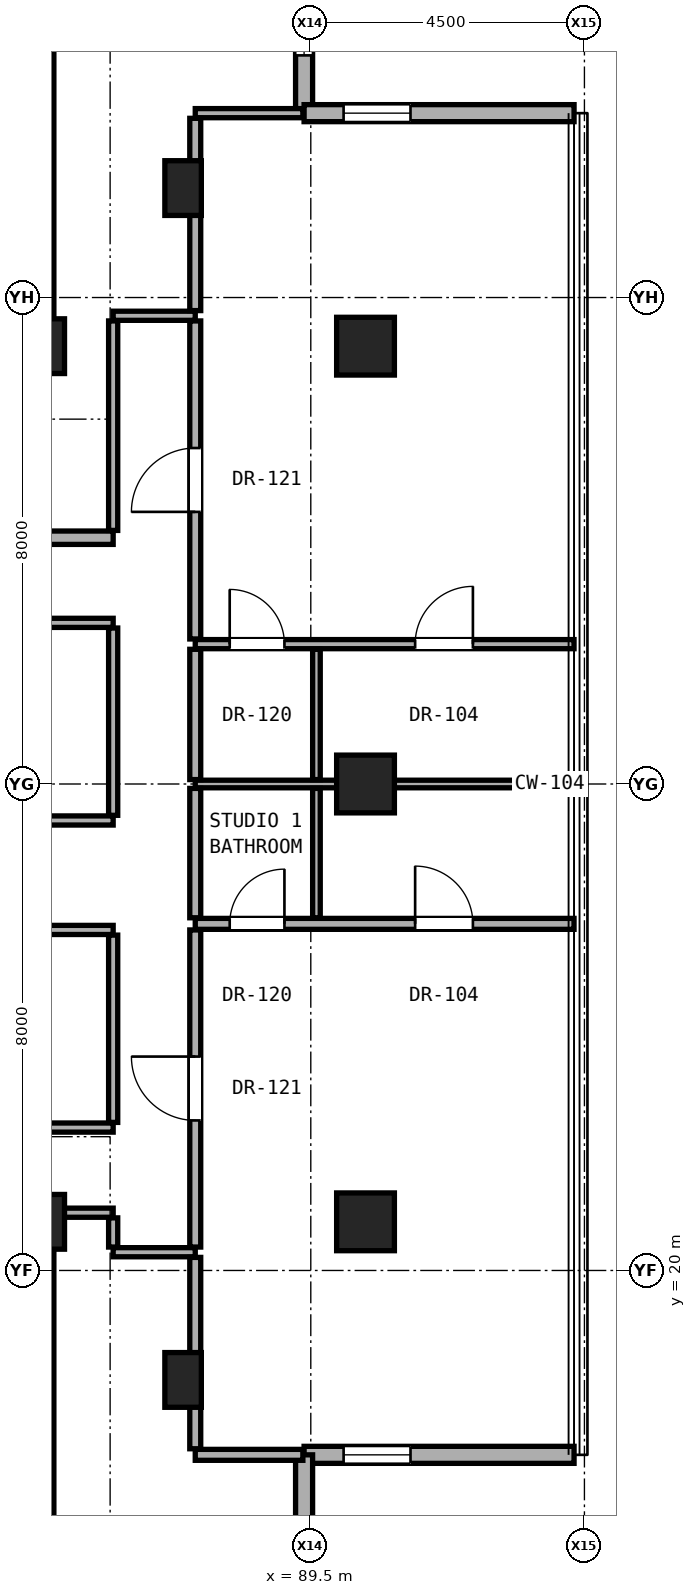
"""IFC4 building model, lengths in metres.
Left out: names, types, materials, properties, quantities, classifications, styles, units other than length and angle.
Written with IfcOpenShell. Run it as: python <this file> out.ifc"""

import sys

from ifc_helpers import new_model, si_unit, direction, frame, frame_2d, origin, origin_2d, place, context, subcontext, project, spatial, rectangle, hollow_rectangle, extrude, element, fill, save


model = new_model("IFC4")
c1 = context("Model", 3, precision=1e-05, world=origin(), true_north=direction((0.0, 1.0)))
c2 = subcontext(c1, "Body", "Model", "MODEL_VIEW")
j1 = project(units=[si_unit("LENGTHUNIT", "METRE"), si_unit("PLANEANGLEUNIT", "RADIAN")], contexts=[c1])
p1 = place(None, origin())
s1 = spatial("IfcSite", under=j1, at=p1, CompositionType="ELEMENT")
p2 = place(p1, origin())
s2 = spatial("IfcBuilding", under=s1, at=p2, CompositionType="ELEMENT")
p3 = place(p2, frame((0.0, 0.0, 196.65)))
s3 = spatial("IfcBuildingStorey", under=s2, at=p3, CompositionType="ELEMENT", Elevation=196.65)
for number, where, z_axis, x_axis in (
    (1, (85.0, 20.8, 0.0), (0.0, 0.0, 1.0), (1.0, 0.0, 0.0)),
    (2, (85.0, 35.2, 0.0), (0.0, 0.0, 1.0), (1.0, 0.0, 0.0)),
):
    element("IfcColumn", number, at=place(p3, frame(where, z_axis=z_axis, x_axis=x_axis)), inside=s3, PredefinedType="COLUMN", context=c2, shape_type="SweptSolid", body=[
        extrude(rectangle(XDim=0.9, YDim=0.9, at=origin_2d()), origin(), (0.0, 0.0, 1.0), 3.25),
    ])
for number, where, z_axis, x_axis in (
    (3, (90.4, 20.8, 0.0), (0.0, 0.0, 1.0), (1.0, 0.0, 0.0)),
    (4, (90.4, 28.0, 0.0), (0.0, 0.0, 1.0), (1.0, 0.0, 0.0)),
    (5, (90.4, 35.2, 0.0), (0.0, 0.0, 1.0), (1.0, 0.0, 0.0)),
):
    element("IfcColumn", number, at=place(p3, frame(where, z_axis=z_axis, x_axis=x_axis)), inside=s3, PredefinedType="COLUMN", context=c2, shape_type="SweptSolid", body=[
        extrude(hollow_rectangle(XDim=0.95, YDim=0.95, WallThickness=0.05, at=origin_2d()), origin(), (0.0, 0.0, 1.0), 3.25),
    ])
for number, where, z_axis, x_axis in (
    (6, (87.4, 18.2, 0.0), (0.0, 0.0, 1.0), (1.0, 0.0, 0.0)),
    (7, (87.4, 37.8, 0.0), (0.0, 0.0, 1.0), (1.0, 0.0, 0.0)),
):
    element("IfcColumn", number, at=place(p3, frame(where, z_axis=z_axis, x_axis=x_axis)), inside=s3, PredefinedType="PILASTER", context=c2, shape_type="SweptSolid", body=[
        extrude(rectangle(XDim=0.6, YDim=0.9, at=origin_2d()), origin(), (0.0, 0.0, 1.0), 3.25),
    ])
for number, where, z_axis, x_axis in (
    (8, (85.0, 35.2, 0.0), (0.0, 0.0, 1.0), (0.0, 1.0, 0.0)),
    (9, (85.0, 15.2, 0.0), (0.0, 0.0, 1.0), (0.0, 1.0, 0.0)),
):
    element("IfcWall", number, at=place(p3, frame(where, z_axis=z_axis, x_axis=x_axis)), inside=s3, PredefinedType="SHEAR", context=c2, shape_type="SweptSolid", body=[
        extrude(rectangle(XDim=5.6, YDim=0.55, at=frame_2d((2.8, 0.0))), origin(), (0.0, 0.0, 1.0), 3.05),
    ])
p4 = place(p3, frame((89.39, 39.032, 0.0), z_axis=(0.0, 0.0, 1.0), x_axis=(0.0, 1.0, 0.0)))
e10 = element("IfcWall", 10, at=p4, inside=s3, PredefinedType="SOLIDWALL", context=c2, shape_type="SweptSolid", body=[
    extrude(rectangle(XDim=4.44, YDim=0.28, at=frame_2d((2.22, 0.0))), origin(), (0.0, 0.0, 1.0), 3.03),
])
p5 = place(p4, frame((0.95, 0.0, 0.85)))
e11 = element("IfcOpeningElement", 11, at=p5, cuts=e10, PredefinedType="OPENING", context=c2, shape_type="SweptSolid", body=[
    extrude(rectangle(XDim=1.1, YDim=2.0, at=frame_2d((0.55, 1.0))), frame((0.0, 0.15, 0.0), z_axis=(0.0, -1.0, 0.0), x_axis=(1.0, 0.0, 0.0)), (0.0, 0.0, 1.0), 0.3),
])
p6 = place(p3, frame((89.39, 16.968, 0.0), z_axis=(0.0, 0.0, 1.0), x_axis=(1.0, 0.0, 0.0)))
e12 = element("IfcWall", 12, at=p6, inside=s3, PredefinedType="SOLIDWALL", context=c2, shape_type="SweptSolid", body=[
    extrude(rectangle(XDim=4.44, YDim=0.28, at=frame_2d((2.22, 0.0))), origin(), (0.0, 0.0, 1.0), 3.03),
])
p7 = place(p6, frame((0.65, 0.0, 0.85)))
e13 = element("IfcOpeningElement", 13, at=p7, cuts=e12, PredefinedType="OPENING", context=c2, shape_type="SweptSolid", body=[
    extrude(rectangle(XDim=1.1, YDim=2.0, at=frame_2d((0.55, 1.0))), frame((0.0, 0.15, 0.0), z_axis=(0.0, -1.0, 0.0), x_axis=(1.0, 0.0, 0.0)), (0.0, 0.0, 1.0), 0.3),
])
p8 = place(p3, frame((89.39, 12.528, 0.0), z_axis=(0.0, 0.0, 1.0), x_axis=(0.0, 1.0, 0.0)))
e14 = element("IfcWall", 14, at=p8, inside=s3, PredefinedType="SOLIDWALL", context=c2, shape_type="SweptSolid", body=[
    extrude(rectangle(XDim=4.44, YDim=0.28, at=frame_2d((2.22, 0.0))), origin(), (0.0, 0.0, 1.0), 3.03),
])
p9 = place(p3, frame((93.83, 39.032, 0.0), z_axis=(0.0, 0.0, 1.0), x_axis=(-1.0, 0.0, 0.0)))
e15 = element("IfcWall", 15, at=p9, inside=s3, PredefinedType="SOLIDWALL", context=c2, shape_type="SweptSolid", body=[
    extrude(rectangle(XDim=4.44, YDim=0.28, at=frame_2d((2.22, 0.0))), origin(), (0.0, 0.0, 1.0), 3.03),
])
p10 = place(p9, frame((2.69, 0.0, 0.85)))
e16 = element("IfcOpeningElement", 16, at=p10, cuts=e15, PredefinedType="OPENING", context=c2, shape_type="SweptSolid", body=[
    extrude(rectangle(XDim=1.1, YDim=2.0, at=frame_2d((0.55, 1.0))), frame((0.0, 0.15, 0.0), z_axis=(0.0, -1.0, 0.0), x_axis=(1.0, 0.0, 0.0)), (0.0, 0.0, 1.0), 0.3),
])
p11 = place(p3, frame((87.6, 16.968, 0.0), z_axis=(0.0, 0.0, 1.0), x_axis=(1.0, 0.0, 0.0)))
e17 = element("IfcWall", 17, at=p11, inside=s3, PredefinedType="PARTITIONING", context=c2, shape_type="SweptSolid", body=[
    extrude(rectangle(XDim=1.77, YDim=0.18, at=frame_2d((0.885, 0.0))), origin(), (0.0, 0.0, 1.0), 3.05),
])
p12 = place(p3, frame((86.25, 20.3, 0.0), z_axis=(0.0, 0.0, 1.0), x_axis=(1.0, 0.0, 0.0)))
e18 = element("IfcWall", 18, at=p12, inside=s3, PredefinedType="PARTITIONING", context=c2, shape_type="SweptSolid", body=[
    extrude(rectangle(XDim=1.35, YDim=0.15, at=frame_2d((0.675, 0.0))), origin(), (0.0, 0.0, 1.0), 3.05),
])
p13 = place(p3, frame((85.27, 20.95, 0.0), z_axis=(0.0, 0.0, 1.0), x_axis=(1.0, 0.0, 0.0)))
e19 = element("IfcWall", 19, at=p13, inside=s3, PredefinedType="PARTITIONING", context=c2, shape_type="SweptSolid", body=[
    extrude(rectangle(XDim=0.98, YDim=0.15, at=frame_2d((0.49, 0.0))), origin(), (0.0, 0.0, 1.0), 2.442),
])
p14 = place(p3, frame((78.64, 22.35, 0.0), z_axis=(0.0, 0.0, 1.0), x_axis=(1.0, 0.0, 0.0)))
e20 = element("IfcWall", 20, at=p14, inside=s3, PredefinedType="PARTITIONING", context=c2, shape_type="SweptSolid", body=[
    extrude(rectangle(XDim=7.61, YDim=0.15, at=frame_2d((3.805, 0.0))), origin(), (0.0, 0.0, 1.0), 2.186),
])
p15 = place(p14, frame((3.33, 0.0, 0.0)))
e21 = element("IfcOpeningElement", 21, at=p15, cuts=e20, PredefinedType="OPENING", context=c2, shape_type="SweptSolid", body=[
    extrude(rectangle(XDim=0.95, YDim=2.15, at=frame_2d((0.475, 1.075))), frame((0.0, 0.085, 0.0), z_axis=(0.0, -1.0, 0.0), x_axis=(1.0, 0.0, 0.0)), (0.0, 0.0, 1.0), 0.17),
])
p16 = place(p3, frame((78.6, 25.6, 0.0), z_axis=(0.0, 0.0, 1.0), x_axis=(1.0, 0.0, 0.0)))
e22 = element("IfcWall", 22, at=p16, inside=s3, PredefinedType="PARTITIONING", context=c2, shape_type="SweptSolid", body=[
    extrude(rectangle(XDim=7.65, YDim=0.15, at=frame_2d((3.825, 0.0))), origin(), (0.0, 0.0, 1.0), 2.186),
])
p17 = place(p3, frame((87.6, 25.7, 0.0), z_axis=(0.0, 0.0, 1.0), x_axis=(1.0, 0.0, 0.0)))
e23 = element("IfcWall", 23, at=p17, inside=s3, PredefinedType="PARTITIONING", context=c2, shape_type="SweptSolid", body=[
    extrude(rectangle(XDim=6.229, YDim=0.18, at=frame_2d((3.115, 0.0))), origin(), (0.0, 0.0, 1.0), 2.269),
])
p18 = place(p17, frame((3.616, 0.0, 0.0)))
e24 = element("IfcOpeningElement", 24, at=p18, cuts=e23, PredefinedType="OPENING", context=c2, shape_type="SweptSolid", body=[
    extrude(rectangle(XDim=0.95, YDim=2.15, at=frame_2d((0.475, 1.075))), frame((0.0, 0.1, 0.0), z_axis=(0.0, -1.0, 0.0), x_axis=(1.0, 0.0, 0.0)), (0.0, 0.0, 1.0), 0.2),
])
p19 = place(p17, frame((0.566, 0.0, 0.0)))
e25 = element("IfcOpeningElement", 25, at=p19, cuts=e23, PredefinedType="OPENING", context=c2, shape_type="SweptSolid", body=[
    extrude(rectangle(XDim=0.9, YDim=2.1, at=frame_2d((0.45, 1.05))), frame((0.0, 0.1, 0.0), z_axis=(0.0, -1.0, 0.0), x_axis=(1.0, 0.0, 0.0)), (0.0, 0.0, 1.0), 0.2),
])
p20 = place(p3, frame((78.6, 27.4, 0.0), z_axis=(0.0, 0.0, 1.0), x_axis=(1.0, 0.0, 0.0)))
e26 = element("IfcWall", 26, at=p20, inside=s3, PredefinedType="PARTITIONING", context=c2, shape_type="SweptSolid", body=[
    extrude(rectangle(XDim=7.65, YDim=0.15, at=frame_2d((3.825, 0.0))), origin(), (0.0, 0.0, 1.0), 2.186),
])
p21 = place(p3, frame((87.6, 28.0, 0.0), z_axis=(0.0, 0.0, 1.0), x_axis=(1.0, 0.0, 0.0)))
e27 = element("IfcWall", 27, at=p21, inside=s3, PredefinedType="PARTITIONING", context=c2, shape_type="SweptSolid", body=[
    extrude(rectangle(XDim=6.229, YDim=0.125, at=frame_2d((3.115, 0.0))), origin(), (0.0, 0.0, 1.0), 2.269),
])
p22 = place(p3, frame((87.6, 30.3, 0.0), z_axis=(0.0, 0.0, 1.0), x_axis=(1.0, 0.0, 0.0)))
e28 = element("IfcWall", 28, at=p22, inside=s3, PredefinedType="PARTITIONING", context=c2, shape_type="SweptSolid", body=[
    extrude(rectangle(XDim=6.229, YDim=0.15, at=frame_2d((3.115, 0.0))), origin(), (0.0, 0.0, 1.0), 2.269),
])
p23 = place(p22, frame((3.616, 0.0, 0.0)))
e29 = element("IfcOpeningElement", 29, at=p23, cuts=e28, PredefinedType="OPENING", context=c2, shape_type="SweptSolid", body=[
    extrude(rectangle(XDim=0.95, YDim=2.15, at=frame_2d((0.475, 1.075))), frame((0.0, 0.085, 0.0), z_axis=(0.0, -1.0, 0.0), x_axis=(1.0, 0.0, 0.0)), (0.0, 0.0, 1.0), 0.17),
])
p24 = place(p22, frame((0.566, 0.0, 0.0)))
e30 = element("IfcOpeningElement", 30, at=p24, cuts=e28, PredefinedType="OPENING", context=c2, shape_type="SweptSolid", body=[
    extrude(rectangle(XDim=0.9, YDim=2.1, at=frame_2d((0.45, 1.05))), frame((0.0, 0.085, 0.0), z_axis=(0.0, -1.0, 0.0), x_axis=(1.0, 0.0, 0.0)), (0.0, 0.0, 1.0), 0.17),
])
p25 = place(p3, frame((78.64, 30.65, 0.0), z_axis=(0.0, 0.0, 1.0), x_axis=(1.0, 0.0, 0.0)))
e31 = element("IfcWall", 31, at=p25, inside=s3, PredefinedType="PARTITIONING", context=c2, shape_type="SweptSolid", body=[
    extrude(rectangle(XDim=7.61, YDim=0.15, at=frame_2d((3.805, 0.0))), origin(), (0.0, 0.0, 1.0), 2.186),
])
p26 = place(p25, frame((3.33, 0.0, 0.0)))
e32 = element("IfcOpeningElement", 32, at=p26, cuts=e31, PredefinedType="OPENING", context=c2, shape_type="SweptSolid", body=[
    extrude(rectangle(XDim=0.95, YDim=2.15, at=frame_2d((0.475, 1.075))), frame((0.0, 0.085, 0.0), z_axis=(0.0, -1.0, 0.0), x_axis=(1.0, 0.0, 0.0)), (0.0, 0.0, 1.0), 0.17),
])
p27 = place(p3, frame((71.55, 32.05, 0.0), z_axis=(0.0, 0.0, 1.0), x_axis=(1.0, 0.0, 0.0)))
e33 = element("IfcWall", 33, at=p27, inside=s3, PredefinedType="SOLIDWALL", context=c2, shape_type="SweptSolid", body=[
    extrude(rectangle(XDim=14.7, YDim=0.22, at=frame_2d((7.35, 0.0))), origin(), (0.0, 0.0, 1.0), 2.186),
])
p28 = place(p27, frame((6.065, 0.0, 0.0)))
e34 = element("IfcOpeningElement", 34, at=p28, cuts=e33, PredefinedType="OPENING", context=c2, shape_type="SweptSolid", body=[
    extrude(rectangle(XDim=0.85, YDim=2.01, at=frame_2d((0.425, 1.005))), frame((0.0, 0.12, 0.0), z_axis=(0.0, -1.0, 0.0), x_axis=(1.0, 0.0, 0.0)), (0.0, 0.0, 1.0), 0.24),
])
p29 = place(p27, frame((10.535, 0.0, 0.0)))
e35 = element("IfcOpeningElement", 35, at=p29, cuts=e33, PredefinedType="OPENING", context=c2, shape_type="SweptSolid", body=[
    extrude(rectangle(XDim=0.95, YDim=2.15, at=frame_2d((0.475, 1.075))), frame((0.0, 0.12, 0.0), z_axis=(0.0, -1.0, 0.0), x_axis=(1.0, 0.0, 0.0)), (0.0, 0.0, 1.0), 0.24),
])
p30 = place(p27, frame((0.7, 0.0, 0.0)))
e36 = element("IfcOpeningElement", 36, at=p30, cuts=e33, PredefinedType="OPENING", context=c2, shape_type="SweptSolid", body=[
    extrude(rectangle(XDim=0.85, YDim=2.01, at=frame_2d((0.425, 1.005))), frame((0.0, 0.12, 0.0), z_axis=(0.0, -1.0, 0.0), x_axis=(1.0, 0.0, 0.0)), (0.0, 0.0, 1.0), 0.24),
])
p31 = place(p27, frame((2.55, 0.0, 0.0)))
e37 = element("IfcOpeningElement", 37, at=p31, cuts=e33, PredefinedType="OPENING", context=c2, shape_type="SweptSolid", body=[
    extrude(rectangle(XDim=0.85, YDim=2.01, at=frame_2d((0.425, 1.005))), frame((0.0, 0.12, 0.0), z_axis=(0.0, -1.0, 0.0), x_axis=(1.0, 0.0, 0.0)), (0.0, 0.0, 1.0), 0.24),
])
p32 = place(p3, frame((86.25, 35.7, 0.0), z_axis=(0.0, 0.0, 1.0), x_axis=(1.0, 0.0, 0.0)))
e38 = element("IfcWall", 38, at=p32, inside=s3, PredefinedType="PARTITIONING", context=c2, shape_type="SweptSolid", body=[
    extrude(rectangle(XDim=1.35, YDim=0.15, at=frame_2d((0.675, 0.0))), origin(), (0.0, 0.0, 1.0), 3.05),
])
p33 = place(p3, frame((87.6, 39.032, 0.0), z_axis=(0.0, 0.0, 1.0), x_axis=(1.0, 0.0, 0.0)))
e39 = element("IfcWall", 39, at=p33, inside=s3, PredefinedType="PARTITIONING", context=c2, shape_type="SweptSolid", body=[
    extrude(rectangle(XDim=1.77, YDim=0.15, at=frame_2d((0.885, 0.0))), origin(), (0.0, 0.0, 1.0), 3.05),
])
p34 = place(p3, frame((86.25, 20.385, 0.0), z_axis=(0.0, 0.0, 1.0), x_axis=(0.0, 1.0, 0.0)))
e40 = element("IfcWall", 40, at=p34, inside=s3, PredefinedType="PARTITIONING", context=c2, shape_type="SweptSolid", body=[
    extrude(rectangle(XDim=0.48, YDim=0.15, at=frame_2d((0.24, 0.0))), origin(), (0.0, 0.0, 1.0), 2.442),
])
p35 = place(p3, frame((86.25, 22.435, 0.0), z_axis=(0.0, 0.0, 1.0), x_axis=(0.0, 1.0, 0.0)))
e41 = element("IfcWall", 41, at=p35, inside=s3, PredefinedType="PARTITIONING", context=c2, shape_type="SweptSolid", body=[
    extrude(rectangle(XDim=3.08, YDim=0.15, at=frame_2d((1.54, 0.0))), origin(), (0.0, 0.0, 1.0), 3.05),
])
p36 = place(p3, frame((86.25, 27.485, 0.0), z_axis=(0.0, 0.0, 1.0), x_axis=(0.0, 1.0, 0.0)))
e42 = element("IfcWall", 42, at=p36, inside=s3, PredefinedType="PARTITIONING", context=c2, shape_type="SweptSolid", body=[
    extrude(rectangle(XDim=3.08, YDim=0.15, at=frame_2d((1.54, 0.0))), origin(), (0.0, 0.0, 1.0), 2.346),
])
p37 = place(p3, frame((86.25, 32.17, 0.0), z_axis=(0.0, 0.0, 1.0), x_axis=(0.0, 1.0, 0.0)))
e43 = element("IfcWall", 43, at=p37, inside=s3, PredefinedType="PARTITIONING", context=c2, shape_type="SweptSolid", body=[
    extrude(rectangle(XDim=3.445, YDim=0.15, at=frame_2d((1.723, 0.0))), origin(), (0.0, 0.0, 1.0), 2.442),
])
p38 = place(p3, frame((87.6, 17.068, 0.0), z_axis=(0.0, 0.0, 1.0), x_axis=(0.0, 1.0, 0.0)))
e44 = element("IfcWall", 44, at=p38, inside=s3, PredefinedType="PARTITIONING", context=c2, shape_type="SweptSolid", body=[
    extrude(rectangle(XDim=3.147, YDim=0.18, at=frame_2d((1.573, 0.0))), origin(), (0.0, 0.0, 1.0), 2.493),
])
p39 = place(p3, frame((87.6, 20.385, 0.0), z_axis=(0.0, 0.0, 1.0), x_axis=(0.0, 1.0, 0.0)))
e45 = element("IfcWall", 45, at=p39, inside=s3, PredefinedType="PARTITIONING", context=c2, shape_type="SweptSolid", body=[
    extrude(rectangle(XDim=5.215, YDim=0.18, at=frame_2d((2.607, 0.0))), origin(), (0.0, 0.0, 1.0), 2.442),
])
p40 = place(p39, frame((2.083, 0.0, 0.0)))
e46 = element("IfcOpeningElement", 46, at=p40, cuts=e45, PredefinedType="OPENING", context=c2, shape_type="SweptSolid", body=[
    extrude(rectangle(XDim=1.05, YDim=2.2, at=frame_2d((0.525, 1.1))), frame((0.0, 0.1, 0.0), z_axis=(0.0, -1.0, 0.0), x_axis=(1.0, 0.0, 0.0)), (0.0, 0.0, 1.0), 0.2),
])
p41 = place(p3, frame((87.6, 25.8, 0.0), z_axis=(0.0, 0.0, 1.0), x_axis=(0.0, 1.0, 0.0)))
e47 = element("IfcWall", 47, at=p41, inside=s3, PredefinedType="PARTITIONING", context=c2, shape_type="SweptSolid", body=[
    extrude(rectangle(XDim=2.127, YDim=0.18, at=frame_2d((1.064, 0.0))), origin(), (0.0, 0.0, 1.0), 2.346),
])
p42 = place(p3, frame((87.6, 28.073, 0.0), z_axis=(0.0, 0.0, 1.0), x_axis=(0.0, 1.0, 0.0)))
e48 = element("IfcWall", 48, at=p42, inside=s3, PredefinedType="PARTITIONING", context=c2, shape_type="SweptSolid", body=[
    extrude(rectangle(XDim=2.143, YDim=0.18, at=frame_2d((1.071, 0.0))), origin(), (0.0, 0.0, 1.0), 2.346),
])
p43 = place(p3, frame((87.6, 30.385, 0.0), z_axis=(0.0, 0.0, 1.0), x_axis=(0.0, 1.0, 0.0)))
e49 = element("IfcWall", 49, at=p43, inside=s3, PredefinedType="PARTITIONING", context=c2, shape_type="SweptSolid", body=[
    extrude(rectangle(XDim=5.23, YDim=0.18, at=frame_2d((2.615, 0.0))), origin(), (0.0, 0.0, 1.0), 2.442),
])
p44 = place(p43, frame((2.09, 0.0, 0.0)))
e50 = element("IfcOpeningElement", 50, at=p44, cuts=e49, PredefinedType="OPENING", context=c2, shape_type="SweptSolid", body=[
    extrude(rectangle(XDim=1.05, YDim=2.2, at=frame_2d((0.525, 1.1))), frame((0.0, 0.1, 0.0), z_axis=(0.0, -1.0, 0.0), x_axis=(1.0, 0.0, 0.0)), (0.0, 0.0, 1.0), 0.2),
])
p45 = place(p3, frame((87.6, 35.785, 0.0), z_axis=(0.0, 0.0, 1.0), x_axis=(0.0, 1.0, 0.0)))
e51 = element("IfcWall", 51, at=p45, inside=s3, PredefinedType="PARTITIONING", context=c2, shape_type="SweptSolid", body=[
    extrude(rectangle(XDim=3.162, YDim=0.18, at=frame_2d((1.581, 0.0))), origin(), (0.0, 0.0, 1.0), 2.493),
])
p46 = place(p3, frame((89.593, 25.8, 0.0), z_axis=(0.0, 0.0, 1.0), x_axis=(0.0, 1.0, 0.0)))
e52 = element("IfcWall", 52, at=p46, inside=s3, PredefinedType="PARTITIONING", context=c2, shape_type="SweptSolid", body=[
    extrude(rectangle(XDim=2.127, YDim=0.125, at=frame_2d((1.064, 0.0))), origin(), (0.0, 0.0, 1.0), 2.346),
])
p47 = place(p3, frame((89.593, 28.073, 0.0), z_axis=(0.0, 0.0, 1.0), x_axis=(0.0, 1.0, 0.0)))
e53 = element("IfcWall", 53, at=p47, inside=s3, PredefinedType="PARTITIONING", context=c2, shape_type="SweptSolid", body=[
    extrude(rectangle(XDim=2.143, YDim=0.125, at=frame_2d((1.071, 0.0))), origin(), (0.0, 0.0, 1.0), 2.346),
])
p48 = place(p5, origin())
e54 = element("IfcWindow", 54, at=p48, inside=s3, PartitioningType="SINGLE_PANEL", PredefinedType="WINDOW", context=c2, shape_type="SweptSolid", body=[
    extrude(rectangle(XDim=1.1, YDim=2.0, at=frame_2d((0.55, 1.0))), frame((0.0, 0.03, 0.0), z_axis=(0.0, -1.0, 0.0), x_axis=(1.0, 0.0, 0.0)), (0.0, 0.0, 1.0), 0.06),
])
fill(e11, e54)
p49 = place(p7, origin())
e55 = element("IfcWindow", 55, at=p49, inside=s3, PartitioningType="SINGLE_PANEL", PredefinedType="WINDOW", context=c2, shape_type="SweptSolid", body=[
    extrude(rectangle(XDim=1.1, YDim=2.0, at=frame_2d((0.55, 1.0))), frame((0.0, 0.03, 0.0), z_axis=(0.0, -1.0, 0.0), x_axis=(1.0, 0.0, 0.0)), (0.0, 0.0, 1.0), 0.06),
])
fill(e13, e55)
p50 = place(p10, origin())
e56 = element("IfcWindow", 56, at=p50, inside=s3, PartitioningType="SINGLE_PANEL", PredefinedType="WINDOW", context=c2, shape_type="SweptSolid", body=[
    extrude(rectangle(XDim=1.1, YDim=2.0, at=frame_2d((0.55, 1.0))), frame((0.0, 0.03, 0.0), z_axis=(0.0, -1.0, 0.0), x_axis=(1.0, 0.0, 0.0)), (0.0, 0.0, 1.0), 0.06),
])
fill(e16, e56)
p51 = place(p40, origin())
e57 = element("IfcDoor", 57, at=p51, inside=s3, OperationType="SINGLE_SWING_RIGHT", PredefinedType="DOOR", context=c2, shape_type="SweptSolid", body=[
    extrude(rectangle(XDim=1.05, YDim=2.2, at=frame_2d((0.525, 1.1))), frame((0.0, 0.025, 0.0), z_axis=(0.0, -1.0, 0.0), x_axis=(1.0, 0.0, 0.0)), (0.0, 0.0, 1.0), 0.05),
])
fill(e46, e57)
p52 = place(p18, origin())
e58 = element("IfcDoor", 58, at=p52, inside=s3, OperationType="SINGLE_SWING_LEFT", PredefinedType="DOOR", context=c2, shape_type="SweptSolid", body=[
    extrude(rectangle(XDim=0.95, YDim=2.15, at=frame_2d((0.475, 1.075))), frame((0.0, 0.025, 0.0), z_axis=(0.0, -1.0, 0.0), x_axis=(1.0, 0.0, 0.0)), (0.0, 0.0, 1.0), 0.05),
])
fill(e24, e58)
p53 = place(p19, origin())
e59 = element("IfcDoor", 59, at=p53, inside=s3, OperationType="SINGLE_SWING_RIGHT", PredefinedType="DOOR", context=c2, shape_type="SweptSolid", body=[
    extrude(rectangle(XDim=0.9, YDim=2.1, at=frame_2d((0.45, 1.05))), frame((0.0, 0.025, 0.0), z_axis=(0.0, -1.0, 0.0), x_axis=(1.0, 0.0, 0.0)), (0.0, 0.0, 1.0), 0.05),
])
fill(e25, e59)
p54 = place(p44, origin())
e60 = element("IfcDoor", 60, at=p54, inside=s3, OperationType="SINGLE_SWING_LEFT", PredefinedType="DOOR", context=c2, shape_type="SweptSolid", body=[
    extrude(rectangle(XDim=1.05, YDim=2.2, at=frame_2d((0.525, 1.1))), frame((0.0, 0.025, 0.0), z_axis=(0.0, -1.0, 0.0), x_axis=(1.0, 0.0, 0.0)), (0.0, 0.0, 1.0), 0.05),
])
fill(e50, e60)
p55 = place(p23, origin())
e61 = element("IfcDoor", 61, at=p55, inside=s3, OperationType="SINGLE_SWING_RIGHT", PredefinedType="DOOR", context=c2, shape_type="SweptSolid", body=[
    extrude(rectangle(XDim=0.95, YDim=2.15, at=frame_2d((0.475, 1.075))), frame((0.0, 0.025, 0.0), z_axis=(0.0, -1.0, 0.0), x_axis=(1.0, 0.0, 0.0)), (0.0, 0.0, 1.0), 0.05),
])
fill(e29, e61)
p56 = place(p24, origin())
e62 = element("IfcDoor", 62, at=p56, inside=s3, OperationType="SINGLE_SWING_LEFT", PredefinedType="DOOR", context=c2, shape_type="SweptSolid", body=[
    extrude(rectangle(XDim=0.9, YDim=2.1, at=frame_2d((0.45, 1.05))), frame((0.0, 0.025, 0.0), z_axis=(0.0, -1.0, 0.0), x_axis=(1.0, 0.0, 0.0)), (0.0, 0.0, 1.0), 0.05),
])
fill(e30, e62)
save(model, sys.argv[1])
